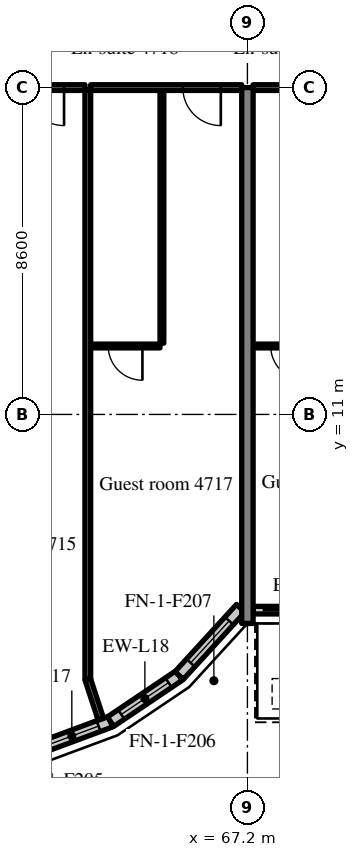
"""IFC4 building model, lengths in metres.
Left out: names, types, materials, properties, quantities, classifications, styles, units other than length and angle.
Written with IfcOpenShell. Run it as: python <this file> out.ifc"""

import sys

from ifc_helpers import new_model, si_unit, direction, frame, frame_2d, origin, place, context, subcontext, project, spatial, rectangle, extrude, source, transform, mapped, element, fill, save


model = new_model("IFC4")
c1 = context("Model", 3, precision=1e-05, world=origin(), true_north=direction((0.0, 1.0)))
c2 = subcontext(c1, "Body", "Model", "MODEL_VIEW")
j1 = project(units=[si_unit("LENGTHUNIT", "METRE"), si_unit("PLANEANGLEUNIT", "RADIAN")], contexts=[c1])
p1 = place(None, origin())
s1 = spatial("IfcSite", under=j1, at=p1, CompositionType="ELEMENT")
p2 = place(p1, origin())
s2 = spatial("IfcBuilding", under=s1, at=p2, CompositionType="ELEMENT")
p3 = place(p2, frame((0.0, 0.0, 193.4)))
s3 = spatial("IfcBuildingStorey", under=s2, at=p3, CompositionType="ELEMENT", Elevation=193.4)
m1 = source(origin(), c2, "Body", "SweptSolid", [
    extrude(rectangle(XDim=14.1, YDim=0.3, at=frame_2d((7.05, 0.0))), origin(), (0.0, 0.0, 1.0), 3.52),
])
p4 = place(p3, frame((67.2, 5.5, 0.0), z_axis=(0.0, 0.0, 1.0), x_axis=(0.0, 1.0, 0.0)))
e1 = element("IfcWall", 1, at=p4, inside=s3, PredefinedType="SHEAR", context=c2, shape_type="MappedRepresentation", body=[
    mapped(m1, transform((0.0, 0.0, 0.0), scale=1.0)),
])
m2 = source(origin(), c2, "Body", "SweptSolid", [
    extrude(rectangle(XDim=2.176, YDim=0.3, at=frame_2d((1.088, 0.0))), origin(), (0.0, 0.0, 1.0), 3.52),
])
p5 = place(p3, frame((61.56, 2.16, 0.0), z_axis=(0.0, 0.0, 1.0), x_axis=(0.937531979054, 0.347899106424, 0.0)))
e2 = element("IfcWall", 2, at=p5, inside=s3, PredefinedType="SOLIDWALL", context=c2, shape_type="MappedRepresentation", body=[
    mapped(m2, transform((0.0, 0.0, 0.0), scale=1.0)),
])
m3 = source(origin(), c2, "Body", "SweptSolid", [
    extrude(rectangle(XDim=1.5, YDim=2.0, at=frame_2d((0.75, 1.0))), frame((0.0, 0.16, 0.0), z_axis=(0.0, -1.0, 0.0), x_axis=(1.0, 0.0, 0.0)), (0.0, 0.0, 1.0), 0.32),
])
p6 = place(p5, frame((0.338, 0.0, 0.9)))
e3 = element("IfcOpeningElement", 3, at=p6, cuts=e2, PredefinedType="OPENING", context=c2, shape_type="MappedRepresentation", body=[
    mapped(m3, transform((0.0, 0.0, 0.0), scale=1.0)),
])
m4 = source(origin(), c2, "Body", "SweptSolid", [
    extrude(rectangle(XDim=2.176, YDim=0.3, at=frame_2d((1.088, 0.0))), origin(), (0.0, 0.0, 1.0), 3.52),
])
p7 = place(p3, frame((63.599, 2.917, 0.0), z_axis=(0.0, 0.0, 1.0), x_axis=(0.829625727223, 0.558319937607, 0.0)))
e4 = element("IfcWall", 4, at=p7, inside=s3, PredefinedType="SOLIDWALL", context=c2, shape_type="MappedRepresentation", body=[
    mapped(m4, transform((0.0, 0.0, 0.0), scale=1.0)),
])
p8 = place(p7, frame((0.338, 0.0, 0.9)))
e5 = element("IfcOpeningElement", 5, at=p8, cuts=e4, PredefinedType="OPENING", context=c2, shape_type="MappedRepresentation", body=[
    mapped(m3, transform((0.0, 0.0, 0.0), scale=1.0)),
])
m5 = source(origin(), c2, "Body", "SweptSolid", [
    extrude(rectangle(XDim=2.398, YDim=0.3, at=frame_2d((1.199, 0.0))), origin(), (0.0, 0.0, 1.0), 3.52),
])
p9 = place(p3, frame((65.404, 4.131, 0.0), z_axis=(0.0, 0.0, 1.0), x_axis=(0.675374189419, 0.737475222815, 0.0)))
e6 = element("IfcWall", 6, at=p9, inside=s3, PredefinedType="SOLIDWALL", context=c2, shape_type="MappedRepresentation", body=[
    mapped(m5, transform((0.0, 0.0, 0.0), scale=1.0)),
])
p10 = place(p9, frame((0.449, 0.0, 0.9)))
e7 = element("IfcOpeningElement", 7, at=p10, cuts=e6, PredefinedType="OPENING", context=c2, shape_type="MappedRepresentation", body=[
    mapped(m3, transform((0.0, 0.0, 0.0), scale=1.0)),
])
m6 = source(origin(), c2, "Body", "SweptSolid", [
    extrude(rectangle(XDim=8.1, YDim=0.2, at=frame_2d((4.05, 0.0))), origin(), (0.0, 0.0, 1.0), 2.87),
])
p11 = place(p3, frame((67.35, 5.85, 0.0), z_axis=(0.0, 0.0, 1.0), x_axis=(1.0, 0.0, 0.0)))
e8 = element("IfcWall", 8, at=p11, inside=s3, PredefinedType="SOLIDWALL", context=c2, shape_type="MappedRepresentation", body=[
    mapped(m6, transform((0.0, 0.0, 0.0), scale=1.0)),
])
m7 = source(origin(), c2, "Body", "SweptSolid", [
    extrude(rectangle(XDim=1.2, YDim=2.4, at=frame_2d((0.6, 1.2))), frame((0.0, 0.11, 0.0), z_axis=(0.0, -1.0, 0.0), x_axis=(1.0, 0.0, 0.0)), (0.0, 0.0, 1.0), 0.22),
])
p12 = place(p11, frame((0.25, 0.0, 0.0)))
e9 = element("IfcOpeningElement", 9, at=p12, cuts=e8, PredefinedType="OPENING", context=c2, shape_type="MappedRepresentation", body=[
    mapped(m7, transform((0.0, 0.0, 0.0), scale=1.0)),
])
m8 = source(origin(), c2, "Body", "SweptSolid", [
    extrude(rectangle(XDim=1.5, YDim=1.5, at=frame_2d((0.75, 0.75))), frame((0.0, 0.11, 0.0), z_axis=(0.0, -1.0, 0.0), x_axis=(1.0, 0.0, 0.0)), (0.0, 0.0, 1.0), 0.22),
])
p13 = place(p11, frame((2.3, 0.0, 0.9)))
e10 = element("IfcOpeningElement", 10, at=p13, cuts=e8, PredefinedType="OPENING", context=c2, shape_type="MappedRepresentation", body=[
    mapped(m8, transform((0.0, 0.0, 0.0), scale=1.0)),
])
p14 = place(p11, frame((4.3, 0.0, 0.0)))
e11 = element("IfcOpeningElement", 11, at=p14, cuts=e8, PredefinedType="OPENING", context=c2, shape_type="MappedRepresentation", body=[
    mapped(m7, transform((0.0, 0.0, 0.0), scale=1.0)),
])
p15 = place(p11, frame((6.35, 0.0, 0.9)))
e12 = element("IfcOpeningElement", 12, at=p15, cuts=e8, PredefinedType="OPENING", context=c2, shape_type="MappedRepresentation", body=[
    mapped(m8, transform((0.0, 0.0, 0.0), scale=1.0)),
])
m9 = source(origin(), c2, "Body", "SweptSolid", [
    extrude(rectangle(XDim=3.975, YDim=0.15, at=frame_2d((1.988, 0.0))), origin(), (0.0, 0.0, 1.0), 2.82),
])
p16 = place(p3, frame((58.95, 19.6, 0.0), z_axis=(0.0, 0.0, 1.0), x_axis=(1.0, 0.0, 0.0)))
e13 = element("IfcWall", 13, at=p16, inside=s3, PredefinedType="PARTITIONING", context=c2, shape_type="MappedRepresentation", body=[
    mapped(m9, transform((0.0, 0.0, 0.0), scale=1.0)),
])
m10 = source(origin(), c2, "Body", "SweptSolid", [
    extrude(rectangle(XDim=1.0, YDim=2.1, at=frame_2d((0.5, 1.05))), frame((0.0, 0.085, 0.0), z_axis=(0.0, -1.0, 0.0), x_axis=(1.0, 0.0, 0.0)), (0.0, 0.0, 1.0), 0.17),
])
p17 = place(p16, frame((2.425, 0.0, 0.0)))
e14 = element("IfcOpeningElement", 14, at=p17, cuts=e13, PredefinedType="OPENING", context=c2, shape_type="MappedRepresentation", body=[
    mapped(m10, transform((0.0, 0.0, 0.0), scale=1.0)),
])
m11 = source(origin(), c2, "Body", "SweptSolid", [
    extrude(rectangle(XDim=6.65, YDim=0.1, at=frame_2d((3.325, 0.0))), origin(), (0.0, 0.0, 1.0), 3.52),
])
p18 = place(p3, frame((64.95, 12.875, 0.0), z_axis=(0.0, 0.0, 1.0), x_axis=(0.0, 1.0, 0.0)))
e15 = element("IfcWall", 15, at=p18, inside=s3, PredefinedType="PARTITIONING", context=c2, shape_type="MappedRepresentation", body=[
    mapped(m11, transform((0.0, 0.0, 0.0), scale=1.0)),
])
m12 = source(origin(), c2, "Body", "SweptSolid", [
    extrude(rectangle(XDim=1.825, YDim=0.1, at=frame_2d((0.913, 0.0))), origin(), (0.0, 0.0, 1.0), 3.52),
])
p19 = place(p3, frame((63.075, 12.8, 0.0), z_axis=(0.0, 0.0, 1.0), x_axis=(1.0, 0.0, 0.0)))
e16 = element("IfcWall", 16, at=p19, inside=s3, PredefinedType="PARTITIONING", context=c2, shape_type="MappedRepresentation", body=[
    mapped(m12, transform((0.0, 0.0, 0.0), scale=1.0)),
])
m13 = source(origin(), c2, "Body", "SweptSolid", [
    extrude(rectangle(XDim=0.9, YDim=2.1, at=frame_2d((0.45, 1.05))), frame((0.0, 0.06, 0.0), z_axis=(0.0, -1.0, 0.0), x_axis=(1.0, 0.0, 0.0)), (0.0, 0.0, 1.0), 0.12),
])
p20 = place(p19, frame((0.462, 0.0, 0.0)))
e17 = element("IfcOpeningElement", 17, at=p20, cuts=e16, PredefinedType="OPENING", context=c2, shape_type="MappedRepresentation", body=[
    mapped(m13, transform((0.0, 0.0, 0.0), scale=1.0)),
])
p21 = place(p3, frame((63.075, 19.6, 0.0), z_axis=(0.0, 0.0, 1.0), x_axis=(1.0, 0.0, 0.0)))
e18 = element("IfcWall", 18, at=p21, inside=s3, PredefinedType="PARTITIONING", context=c2, shape_type="MappedRepresentation", body=[
    mapped(m9, transform((0.0, 0.0, 0.0), scale=1.0)),
])
p22 = place(p21, frame((2.425, 0.0, 0.0)))
e19 = element("IfcOpeningElement", 19, at=p22, cuts=e18, PredefinedType="OPENING", context=c2, shape_type="MappedRepresentation", body=[
    mapped(m10, transform((0.0, 0.0, 0.0), scale=1.0)),
])
m14 = source(origin(), c2, "Body", "SweptSolid", [
    extrude(rectangle(XDim=15.498, YDim=0.15, at=frame_2d((7.749, 0.0))), origin(), (0.0, 0.0, 1.0), 3.52),
])
p23 = place(p3, frame((63.0, 4.027, 0.0), z_axis=(0.0, 0.0, 1.0), x_axis=(0.0, 1.0, 0.0)))
e20 = element("IfcWall", 20, at=p23, inside=s3, PredefinedType="PARTITIONING", context=c2, shape_type="MappedRepresentation", body=[
    mapped(m14, transform((0.0, 0.0, 0.0), scale=1.0)),
])
p24 = place(p3, frame((67.35, 12.8, 0.0), z_axis=(0.0, 0.0, 1.0), x_axis=(1.0, 0.0, 0.0)))
e21 = element("IfcWall", 21, at=p24, inside=s3, PredefinedType="PARTITIONING", context=c2, shape_type="MappedRepresentation", body=[
    mapped(m12, transform((0.0, 0.0, 0.0), scale=1.0)),
])
p25 = place(p24, frame((0.463, 0.0, 0.0)))
e22 = element("IfcOpeningElement", 22, at=p25, cuts=e21, PredefinedType="OPENING", context=c2, shape_type="MappedRepresentation", body=[
    mapped(m13, transform((0.0, 0.0, 0.0), scale=1.0)),
])
m15 = source(origin(), c2, "Body", "SweptSolid", [
    extrude(rectangle(XDim=3.975, YDim=0.15, at=frame_2d((1.987, 0.0))), origin(), (0.0, 0.0, 1.0), 2.82),
])
p26 = place(p3, frame((67.35, 19.6, 0.0), z_axis=(0.0, 0.0, 1.0), x_axis=(1.0, 0.0, 0.0)))
e23 = element("IfcWall", 23, at=p26, inside=s3, PredefinedType="PARTITIONING", context=c2, shape_type="MappedRepresentation", body=[
    mapped(m15, transform((0.0, 0.0, 0.0), scale=1.0)),
])
p27 = place(p26, frame((2.425, 0.0, 0.0)))
e24 = element("IfcOpeningElement", 24, at=p27, cuts=e23, PredefinedType="OPENING", context=c2, shape_type="MappedRepresentation", body=[
    mapped(m10, transform((0.0, 0.0, 0.0), scale=1.0)),
])
m16 = source(origin(), c2, "Body", "SweptSolid", [
    extrude(rectangle(XDim=1.101, YDim=0.15, at=frame_2d((0.55, 0.0))), origin(), (0.0, 0.0, 1.0), 3.52),
])
p28 = place(p3, frame((63.343, 2.981, 0.0), z_axis=(0.0, 0.0, 1.0), x_axis=(-0.311567081539, 0.950224159712, 0.0)))
e25 = element("IfcWall", 25, at=p28, inside=s3, PredefinedType="PARTITIONING", context=c2, shape_type="MappedRepresentation", body=[
    mapped(m16, transform((0.0, 0.0, 0.0), scale=1.0)),
])
m17 = source(origin(), c2, "Body", "SweptSolid", [
    extrude(rectangle(XDim=1.5, YDim=2.0, at=frame_2d((0.75, 1.0))), frame((0.0, 0.03, 0.0), z_axis=(0.0, -1.0, 0.0), x_axis=(1.0, 0.0, 0.0)), (0.0, 0.0, 1.0), 0.06),
])
p29 = place(p6, origin())
e26 = element("IfcWindow", 26, at=p29, inside=s3, PartitioningType="SINGLE_PANEL", PredefinedType="WINDOW", context=c2, shape_type="MappedRepresentation", body=[
    mapped(m17, transform((0.0, 0.0, 0.0), scale=1.0)),
])
fill(e3, e26)
p30 = place(p8, origin())
e27 = element("IfcWindow", 27, at=p30, inside=s3, PartitioningType="SINGLE_PANEL", PredefinedType="WINDOW", context=c2, shape_type="MappedRepresentation", body=[
    mapped(m17, transform((0.0, 0.0, 0.0), scale=1.0)),
])
fill(e5, e27)
p31 = place(p10, origin())
e28 = element("IfcWindow", 28, at=p31, inside=s3, PartitioningType="SINGLE_PANEL", PredefinedType="WINDOW", context=c2, shape_type="MappedRepresentation", body=[
    mapped(m17, transform((0.0, 0.0, 0.0), scale=1.0)),
])
fill(e7, e28)
m18 = source(origin(), c2, "Body", "SweptSolid", [
    extrude(rectangle(XDim=1.2, YDim=2.4, at=frame_2d((0.6, 1.2))), frame((0.0, 0.025, 0.0), z_axis=(0.0, -1.0, 0.0), x_axis=(1.0, 0.0, 0.0)), (0.0, 0.0, 1.0), 0.05),
])
p32 = place(p12, origin())
e29 = element("IfcDoor", 29, at=p32, inside=s3, OperationType="SLIDING_TO_RIGHT", PredefinedType="DOOR", context=c2, shape_type="MappedRepresentation", body=[
    mapped(m18, transform((0.0, 0.0, 0.0), scale=1.0)),
])
fill(e9, e29)
m19 = source(origin(), c2, "Body", "SweptSolid", [
    extrude(rectangle(XDim=1.0, YDim=2.1, at=frame_2d((0.5, 1.05))), frame((0.0, 0.025, 0.0), z_axis=(0.0, -1.0, 0.0), x_axis=(1.0, 0.0, 0.0)), (0.0, 0.0, 1.0), 0.05),
])
p33 = place(p17, origin())
e30 = element("IfcDoor", 30, at=p33, inside=s3, OperationType="SINGLE_SWING_RIGHT", PredefinedType="DOOR", context=c2, shape_type="MappedRepresentation", body=[
    mapped(m19, transform((0.0, 0.0, 0.0), scale=1.0)),
])
fill(e14, e30)
m20 = source(origin(), c2, "Body", "SweptSolid", [
    extrude(rectangle(XDim=0.9, YDim=2.1, at=frame_2d((0.45, 1.05))), frame((0.0, 0.025, 0.0), z_axis=(0.0, -1.0, 0.0), x_axis=(1.0, 0.0, 0.0)), (0.0, 0.0, 1.0), 0.05),
])
p34 = place(p20, origin())
e31 = element("IfcDoor", 31, at=p34, inside=s3, OperationType="SINGLE_SWING_RIGHT", PredefinedType="DOOR", context=c2, shape_type="MappedRepresentation", body=[
    mapped(m20, transform((0.0, 0.0, 0.0), scale=1.0)),
])
fill(e17, e31)
p35 = place(p22, origin())
e32 = element("IfcDoor", 32, at=p35, inside=s3, OperationType="SINGLE_SWING_RIGHT", PredefinedType="DOOR", context=c2, shape_type="MappedRepresentation", body=[
    mapped(m19, transform((0.0, 0.0, 0.0), scale=1.0)),
])
fill(e19, e32)
p36 = place(p25, origin())
e33 = element("IfcDoor", 33, at=p36, inside=s3, OperationType="SINGLE_SWING_RIGHT", PredefinedType="DOOR", context=c2, shape_type="MappedRepresentation", body=[
    mapped(m20, transform((0.0, 0.0, 0.0), scale=1.0)),
])
fill(e22, e33)
save(model, sys.argv[1])
